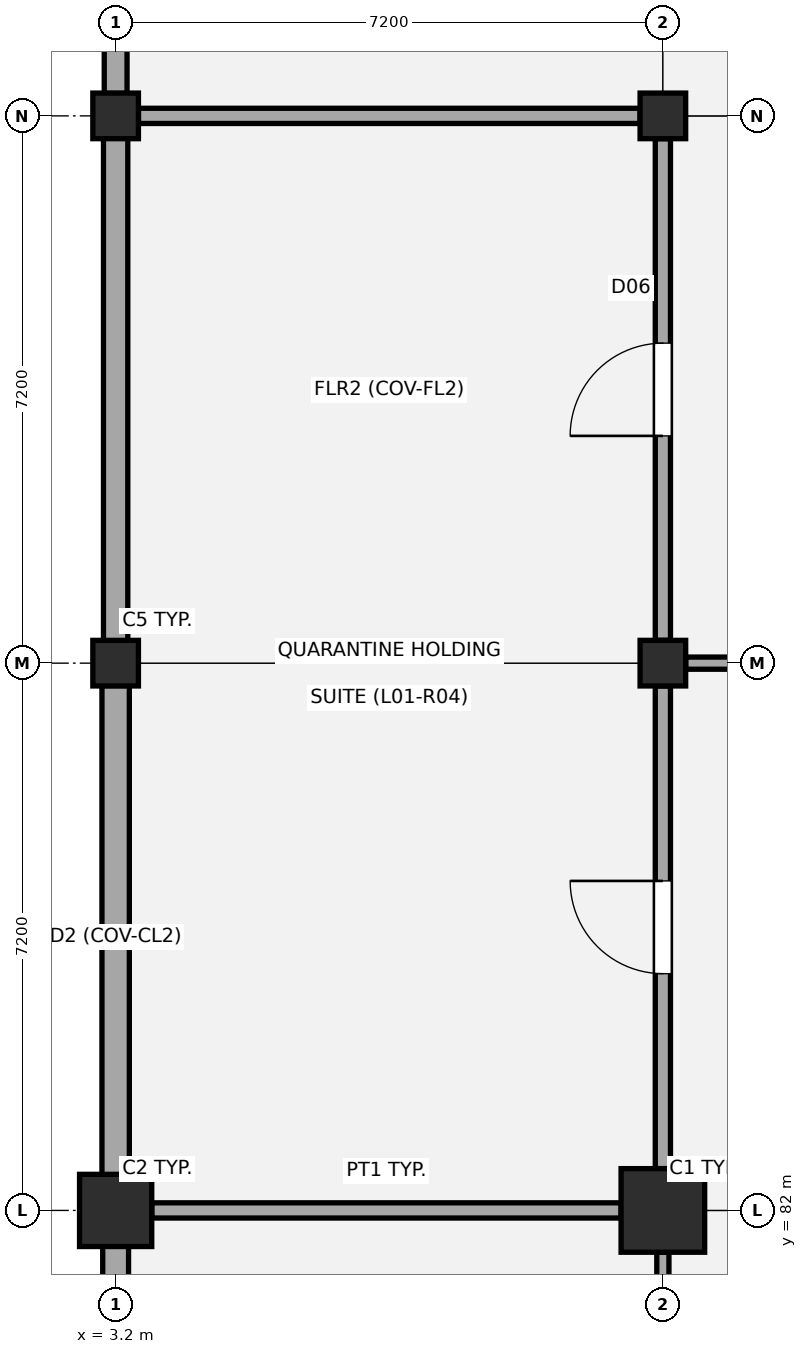
"""IFC4 building model, lengths in metres.
Left out: names, types, materials, properties, quantities, classifications, styles, units other than length and angle.
Written with IfcOpenShell. Run it as: python <this file> out.ifc"""

import sys

from ifc_helpers import new_model, si_unit, direction, frame, frame_2d, origin, origin_2d, place, context, subcontext, project, spatial, rectangle, extrude, element, fill, save


model = new_model("IFC4")
c1 = context("Model", 3, precision=1e-05, world=origin(), true_north=direction((0.0, 1.0)))
c2 = subcontext(c1, "Body", "Model", "MODEL_VIEW")
j1 = project(units=[si_unit("LENGTHUNIT", "METRE"), si_unit("PLANEANGLEUNIT", "RADIAN")], contexts=[c1])
p1 = place(None, origin())
s1 = spatial("IfcSite", under=j1, at=p1, CompositionType="ELEMENT")
p2 = place(p1, origin())
s2 = spatial("IfcBuilding", under=s1, at=p2, CompositionType="ELEMENT")
p3 = place(p2, frame((0.0, 0.0, 4.68)))
s3 = spatial("IfcBuildingStorey", under=s2, at=p3, CompositionType="ELEMENT", Elevation=4.68)
p4 = place(p3, frame((3.2, 82.0, 0.0), z_axis=(0.0, 0.0, 1.0), x_axis=(1.0, 0.0, 0.0)))
e1 = element("IfcColumn", 1, at=p4, inside=s3, PredefinedType="COLUMN", context=c2, shape_type="SweptSolid", body=[
    extrude(rectangle(XDim=0.95, YDim=0.95, at=origin_2d()), origin(), (0.0, 0.0, 1.0), 4.5),
])
for number, where, z_axis, x_axis in (
    (2, (3.2, 89.2, 0.0), (0.0, 0.0, 1.0), (1.0, 0.0, 0.0)),
    (3, (3.2, 96.4, 0.0), (0.0, 0.0, 1.0), (1.0, 0.0, 0.0)),
):
    element("IfcColumn", number, at=place(p3, frame(where, z_axis=z_axis, x_axis=x_axis)), inside=s3, PredefinedType="COLUMN", context=c2, shape_type="SweptSolid", body=[
        extrude(rectangle(XDim=0.6, YDim=0.6, at=origin_2d()), origin(), (0.0, 0.0, 1.0), 4.5),
    ])
p5 = place(p3, frame((10.4, 82.0, 0.0), z_axis=(0.0, 0.0, 1.0), x_axis=(1.0, 0.0, 0.0)))
e4 = element("IfcColumn", 4, at=p5, inside=s3, PredefinedType="COLUMN", context=c2, shape_type="SweptSolid", body=[
    extrude(rectangle(XDim=1.1, YDim=1.1, at=origin_2d()), origin(), (0.0, 0.0, 1.0), 4.5),
])
for number, where, z_axis, x_axis in (
    (5, (10.4, 89.2, 0.0), (0.0, 0.0, 1.0), (1.0, 0.0, 0.0)),
    (6, (10.4, 96.4, 0.0), (0.0, 0.0, 1.0), (1.0, 0.0, 0.0)),
):
    element("IfcColumn", number, at=place(p3, frame(where, z_axis=z_axis, x_axis=x_axis)), inside=s3, PredefinedType="COLUMN", context=c2, shape_type="SweptSolid", body=[
        extrude(rectangle(XDim=0.6, YDim=0.6, at=origin_2d()), origin(), (0.0, 0.0, 1.0), 4.5),
    ])
p6 = place(p3, frame((3.2, 75.345, 0.0), z_axis=(0.0, 0.0, 1.0), x_axis=(0.0, 1.0, 0.0)))
e7 = element("IfcWall", 7, at=p6, inside=s3, PredefinedType="STANDARD", context=c2, shape_type="SweptSolid", body=[
    extrude(rectangle(XDim=6.185, YDim=0.34, at=frame_2d((3.093, 0.0))), origin(), (0.0, 0.0, 1.0), 3.49),
])
p7 = place(p6, frame((2.292, 0.0, 0.95)))
e8 = element("IfcOpeningElement", 8, at=p7, cuts=e7, PredefinedType="OPENING", context=c2, shape_type="SweptSolid", body=[
    extrude(rectangle(XDim=1.6, YDim=1.7, at=frame_2d((0.8, 0.85))), frame((0.0, 0.18, 0.0), z_axis=(0.0, -1.0, 0.0), x_axis=(1.0, 0.0, 0.0)), (0.0, 0.0, 1.0), 0.36),
])
p8 = place(p3, frame((3.2, 82.47, 0.0), z_axis=(0.0, 0.0, 1.0), x_axis=(0.0, 1.0, 0.0)))
e9 = element("IfcWall", 9, at=p8, inside=s3, PredefinedType="STANDARD", context=c2, shape_type="SweptSolid", body=[
    extrude(rectangle(XDim=6.435, YDim=0.36, at=frame_2d((3.218, 0.0))), origin(), (0.0, 0.0, 1.0), 3.51),
])
p9 = place(p3, frame((3.2, 89.495, 0.0), z_axis=(0.0, 0.0, 1.0), x_axis=(0.0, 1.0, 0.0)))
e10 = element("IfcWall", 10, at=p9, inside=s3, PredefinedType="STANDARD", context=c2, shape_type="SweptSolid", body=[
    extrude(rectangle(XDim=6.61, YDim=0.32, at=frame_2d((3.305, 0.0))), origin(), (0.0, 0.0, 1.0), 3.49),
])
p10 = place(p3, frame((3.2, 96.695, 0.0), z_axis=(0.0, 0.0, 1.0), x_axis=(0.0, 1.0, 0.0)))
e11 = element("IfcWall", 11, at=p10, inside=s3, PredefinedType="STANDARD", context=c2, shape_type="SweptSolid", body=[
    extrude(rectangle(XDim=6.61, YDim=0.3, at=frame_2d((3.305, 0.0))), origin(), (0.0, 0.0, 1.0), 3.51),
])
p11 = place(p3, frame((10.4, 75.275, 0.0), z_axis=(0.0, 0.0, 1.0), x_axis=(0.0, 1.0, 0.0)))
e12 = element("IfcWall", 12, at=p11, inside=s3, PredefinedType="PARTITIONING", context=c2, shape_type="SweptSolid", body=[
    extrude(rectangle(XDim=6.175, YDim=0.16, at=frame_2d((3.087, 0.0))), origin(), (0.0, 0.0, 1.0), 3.54),
])
p12 = place(p11, frame((2.448, 0.0, 0.0)))
e13 = element("IfcOpeningElement", 13, at=p12, cuts=e12, PredefinedType="OPENING", context=c2, shape_type="SweptSolid", body=[
    extrude(rectangle(XDim=1.28, YDim=2.2, at=frame_2d((0.64, 1.1))), frame((0.0, 0.09, 0.0), z_axis=(0.0, -1.0, 0.0), x_axis=(1.0, 0.0, 0.0)), (0.0, 0.0, 1.0), 0.18),
])
p13 = place(p3, frame((3.675, 82.0, 0.0), z_axis=(0.0, 0.0, 1.0), x_axis=(1.0, 0.0, 0.0)))
e14 = element("IfcWall", 14, at=p13, inside=s3, PredefinedType="PARTITIONING", context=c2, shape_type="SweptSolid", body=[
    extrude(rectangle(XDim=6.175, YDim=0.2, at=frame_2d((3.087, 0.0))), origin(), (0.0, 0.0, 1.0), 3.59),
])
p14 = place(p3, frame((10.4, 82.55, 0.0), z_axis=(0.0, 0.0, 1.0), x_axis=(0.0, 1.0, 0.0)))
e15 = element("IfcWall", 15, at=p14, inside=s3, PredefinedType="PARTITIONING", context=c2, shape_type="SweptSolid", body=[
    extrude(rectangle(XDim=6.35, YDim=0.2, at=frame_2d((3.175, 0.0))), origin(), (0.0, 0.0, 1.0), 3.59),
])
p15 = place(p14, frame((2.565, 0.0, 0.0)))
e16 = element("IfcOpeningElement", 16, at=p15, cuts=e15, PredefinedType="OPENING", context=c2, shape_type="SweptSolid", body=[
    extrude(rectangle(XDim=1.22, YDim=2.16, at=frame_2d((0.61, 1.08))), frame((0.0, 0.11, 0.0), z_axis=(0.0, -1.0, 0.0), x_axis=(1.0, 0.0, 0.0)), (0.0, 0.0, 1.0), 0.22),
])
p16 = place(p3, frame((10.4, 89.5, 0.0), z_axis=(0.0, 0.0, 1.0), x_axis=(0.0, 1.0, 0.0)))
e17 = element("IfcWall", 17, at=p16, inside=s3, PredefinedType="PARTITIONING", context=c2, shape_type="SweptSolid", body=[
    extrude(rectangle(XDim=6.6, YDim=0.2, at=frame_2d((3.3, 0.0))), origin(), (0.0, 0.0, 1.0), 3.54),
])
p17 = place(p16, frame((2.69, 0.0, 0.0)))
e18 = element("IfcOpeningElement", 18, at=p17, cuts=e17, PredefinedType="OPENING", context=c2, shape_type="SweptSolid", body=[
    extrude(rectangle(XDim=1.22, YDim=2.16, at=frame_2d((0.61, 1.08))), frame((0.0, 0.11, 0.0), z_axis=(0.0, -1.0, 0.0), x_axis=(1.0, 0.0, 0.0)), (0.0, 0.0, 1.0), 0.22),
])
p18 = place(p3, frame((3.5, 96.4, 0.0), z_axis=(0.0, 0.0, 1.0), x_axis=(1.0, 0.0, 0.0)))
e19 = element("IfcWall", 19, at=p18, inside=s3, PredefinedType="PARTITIONING", context=c2, shape_type="SweptSolid", body=[
    extrude(rectangle(XDim=6.6, YDim=0.2, at=frame_2d((3.3, 0.0))), origin(), (0.0, 0.0, 1.0), 3.59),
])
p19 = place(p3, frame((10.7, 89.2, 0.0), z_axis=(0.0, 0.0, 1.0), x_axis=(1.0, 0.0, 0.0)))
e20 = element("IfcWall", 20, at=p19, inside=s3, PredefinedType="PARTITIONING", context=c2, shape_type="SweptSolid", body=[
    extrude(rectangle(XDim=6.6, YDim=0.16, at=frame_2d((3.3, 0.0))), origin(), (0.0, 0.0, 1.0), 3.59),
])
p20 = place(p19, frame((2.37, 0.0, 0.0)))
e21 = element("IfcOpeningElement", 21, at=p20, cuts=e20, PredefinedType="OPENING", context=c2, shape_type="SweptSolid", body=[
    extrude(rectangle(XDim=1.86, YDim=2.26, at=frame_2d((0.93, 1.13))), frame((0.0, 0.09, 0.0), z_axis=(0.0, -1.0, 0.0), x_axis=(1.0, 0.0, 0.0)), (0.0, 0.0, 1.0), 0.18),
])
p21 = place(p17, origin())
e22 = element("IfcDoor", 22, at=p21, inside=s3, OperationType="SINGLE_SWING_LEFT", PredefinedType="DOOR", context=c2, shape_type="SweptSolid", body=[
    extrude(rectangle(XDim=1.22, YDim=2.16, at=frame_2d((0.61, 1.08))), frame((0.0, 0.025, 0.0), z_axis=(0.0, -1.0, 0.0), x_axis=(1.0, 0.0, 0.0)), (0.0, 0.0, 1.0), 0.05),
])
fill(e18, e22)
p22 = place(p15, origin())
e23 = element("IfcDoor", 23, at=p22, inside=s3, OperationType="SINGLE_SWING_RIGHT", PredefinedType="DOOR", context=c2, shape_type="SweptSolid", body=[
    extrude(rectangle(XDim=1.22, YDim=2.16, at=frame_2d((0.61, 1.08))), frame((0.0, 0.025, 0.0), z_axis=(0.0, -1.0, 0.0), x_axis=(1.0, 0.0, 0.0)), (0.0, 0.0, 1.0), 0.05),
])
fill(e16, e23)
save(model, sys.argv[1])
